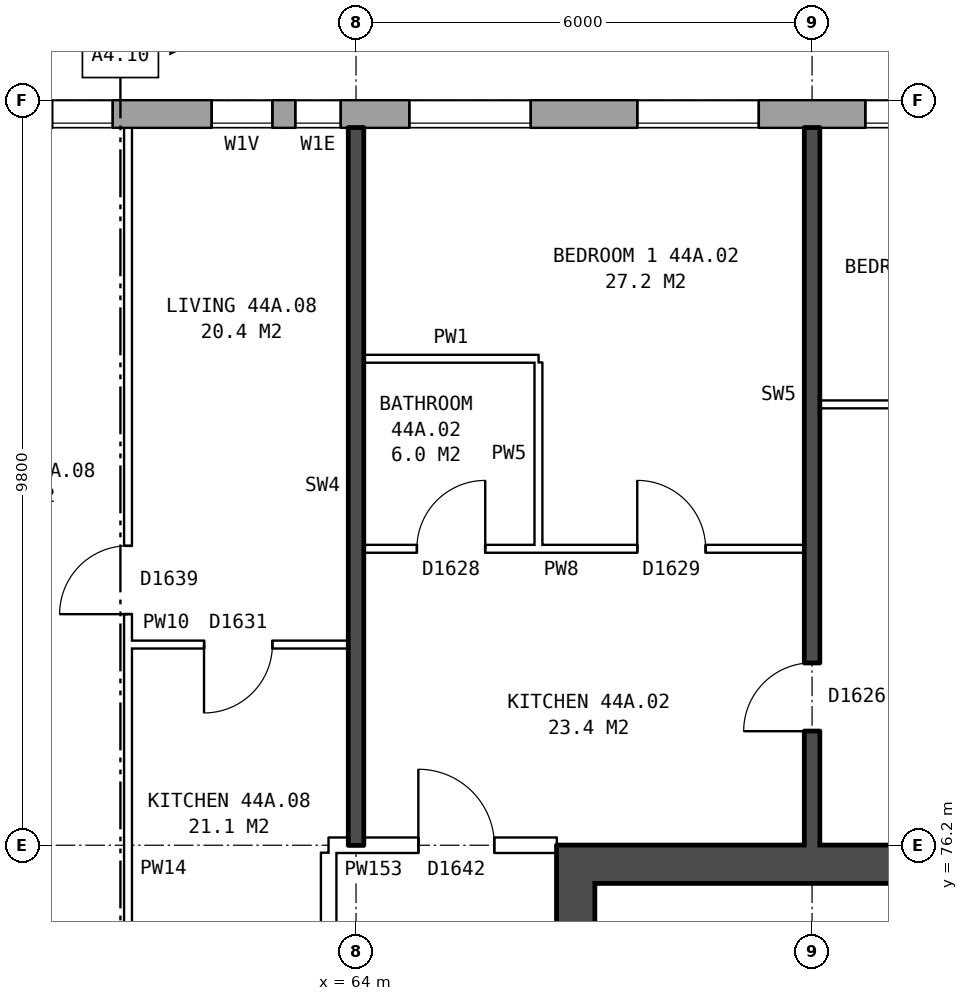
"""IFC4 building model, lengths in metres.
Left out: names, types, materials, properties, quantities, classifications, styles, units other than length and angle.
Written with IfcOpenShell. Run it as: python <this file> out.ifc"""

import sys

from ifc_helpers import new_model, si_unit, direction, frame, frame_2d, origin, place, context, subcontext, project, spatial, rectangle, extrude, element, fill, save


model = new_model("IFC4")
c1 = context("Model", 3, precision=1e-05, world=origin(), true_north=direction((0.0, 1.0)))
c2 = subcontext(c1, "Body", "Model", "MODEL_VIEW")
j1 = project(units=[si_unit("LENGTHUNIT", "METRE"), si_unit("PLANEANGLEUNIT", "RADIAN")], contexts=[c1])
p1 = place(None, origin())
s1 = spatial("IfcSite", under=j1, at=p1, CompositionType="ELEMENT")
p2 = place(p1, origin())
s2 = spatial("IfcBuilding", under=s1, at=p2, CompositionType="ELEMENT")
p3 = place(p2, frame((0.0, 0.0, 157.8)))
s3 = spatial("IfcBuildingStorey", under=s2, at=p3, CompositionType="ELEMENT", Elevation=157.8)
p4 = place(p3, frame((72.925, 85.82, 0.0), z_axis=(0.0, 0.0, 1.0), x_axis=(-1.0, 0.0, 0.0)))
e1 = element("IfcWall", 1, at=p4, inside=s3, PredefinedType="STANDARD", context=c2, shape_type="SweptSolid", body=[
    extrude(rectangle(XDim=41.351, YDim=0.36, at=frame_2d((20.675, 0.0))), origin(), (0.0, 0.0, 1.0), 2.85),
])
p5 = place(p4, frame((0.625, 0.0, 0.8)))
e2 = element("IfcOpeningElement", 2, at=p5, cuts=e1, PredefinedType="OPENING", context=c2, shape_type="SweptSolid", body=[
    extrude(rectangle(XDim=1.6, YDim=1.8, at=frame_2d((0.8, 0.9))), frame((0.0, 0.19, 0.0), z_axis=(0.0, -1.0, 0.0), x_axis=(1.0, 0.0, 0.0)), (0.0, 0.0, 1.0), 0.38),
])
p6 = place(p4, frame((3.625, 0.0, 0.8)))
e3 = element("IfcOpeningElement", 3, at=p6, cuts=e1, PredefinedType="OPENING", context=c2, shape_type="SweptSolid", body=[
    extrude(rectangle(XDim=1.6, YDim=1.8, at=frame_2d((0.8, 0.9))), frame((0.0, 0.19, 0.0), z_axis=(0.0, -1.0, 0.0), x_axis=(1.0, 0.0, 0.0)), (0.0, 0.0, 1.0), 0.38),
])
p7 = place(p4, frame((6.625, 0.0, 0.8)))
e4 = element("IfcOpeningElement", 4, at=p7, cuts=e1, PredefinedType="OPENING", context=c2, shape_type="SweptSolid", body=[
    extrude(rectangle(XDim=1.6, YDim=1.8, at=frame_2d((0.8, 0.9))), frame((0.0, 0.19, 0.0), z_axis=(0.0, -1.0, 0.0), x_axis=(1.0, 0.0, 0.0)), (0.0, 0.0, 1.0), 0.38),
])
p8 = place(p4, frame((9.125, 0.0, 0.8)))
e5 = element("IfcOpeningElement", 5, at=p8, cuts=e1, PredefinedType="OPENING", context=c2, shape_type="SweptSolid", body=[
    extrude(rectangle(XDim=0.6, YDim=1.8, at=frame_2d((0.3, 0.9))), frame((0.0, 0.19, 0.0), z_axis=(0.0, -1.0, 0.0), x_axis=(1.0, 0.0, 0.0)), (0.0, 0.0, 1.0), 0.38),
])
p9 = place(p4, frame((12.125, 0.0, 0.8)))
e6 = element("IfcOpeningElement", 6, at=p9, cuts=e1, PredefinedType="OPENING", context=c2, shape_type="SweptSolid", body=[
    extrude(rectangle(XDim=0.8, YDim=0.9, at=frame_2d((0.4, 0.45))), frame((0.0, 0.19, 0.0), z_axis=(0.0, -1.0, 0.0), x_axis=(1.0, 0.0, 0.0)), (0.0, 0.0, 1.0), 0.38),
])
p10 = place(p4, frame((15.625, 0.0, 0.8)))
e7 = element("IfcOpeningElement", 7, at=p10, cuts=e1, PredefinedType="OPENING", context=c2, shape_type="SweptSolid", body=[
    extrude(rectangle(XDim=1.6, YDim=1.8, at=frame_2d((0.8, 0.9))), frame((0.0, 0.19, 0.0), z_axis=(0.0, -1.0, 0.0), x_axis=(1.0, 0.0, 0.0)), (0.0, 0.0, 1.0), 0.38),
])
p11 = place(p4, frame((18.625, 0.0, 0.8)))
e8 = element("IfcOpeningElement", 8, at=p11, cuts=e1, PredefinedType="OPENING", context=c2, shape_type="SweptSolid", body=[
    extrude(rectangle(XDim=1.6, YDim=1.8, at=frame_2d((0.8, 0.9))), frame((0.0, 0.19, 0.0), z_axis=(0.0, -1.0, 0.0), x_axis=(1.0, 0.0, 0.0)), (0.0, 0.0, 1.0), 0.38),
])
p12 = place(p4, frame((21.625, 0.0, 0.8)))
e9 = element("IfcOpeningElement", 9, at=p12, cuts=e1, PredefinedType="OPENING", context=c2, shape_type="SweptSolid", body=[
    extrude(rectangle(XDim=1.6, YDim=1.8, at=frame_2d((0.8, 0.9))), frame((0.0, 0.19, 0.0), z_axis=(0.0, -1.0, 0.0), x_axis=(1.0, 0.0, 0.0)), (0.0, 0.0, 1.0), 0.38),
])
p13 = place(p4, frame((24.625, 0.0, 0.8)))
e10 = element("IfcOpeningElement", 10, at=p13, cuts=e1, PredefinedType="OPENING", context=c2, shape_type="SweptSolid", body=[
    extrude(rectangle(XDim=1.6, YDim=1.8, at=frame_2d((0.8, 0.9))), frame((0.0, 0.19, 0.0), z_axis=(0.0, -1.0, 0.0), x_axis=(1.0, 0.0, 0.0)), (0.0, 0.0, 1.0), 0.38),
])
p14 = place(p4, frame((27.125, 0.0, 0.8)))
e11 = element("IfcOpeningElement", 11, at=p14, cuts=e1, PredefinedType="OPENING", context=c2, shape_type="SweptSolid", body=[
    extrude(rectangle(XDim=0.8, YDim=1.8, at=frame_2d((0.4, 0.9))), frame((0.0, 0.19, 0.0), z_axis=(0.0, -1.0, 0.0), x_axis=(1.0, 0.0, 0.0)), (0.0, 0.0, 1.0), 0.38),
])
p15 = place(p4, frame((28.225, 0.0, 0.8)))
e12 = element("IfcOpeningElement", 12, at=p15, cuts=e1, PredefinedType="OPENING", context=c2, shape_type="SweptSolid", body=[
    extrude(rectangle(XDim=1.0, YDim=0.9, at=frame_2d((0.5, 0.45))), frame((0.0, 0.19, 0.0), z_axis=(0.0, -1.0, 0.0), x_axis=(1.0, 0.0, 0.0)), (0.0, 0.0, 1.0), 0.38),
])
p16 = place(p4, frame((33.625, 0.0, 0.8)))
e13 = element("IfcOpeningElement", 13, at=p16, cuts=e1, PredefinedType="OPENING", context=c2, shape_type="SweptSolid", body=[
    extrude(rectangle(XDim=1.6, YDim=1.8, at=frame_2d((0.8, 0.9))), frame((0.0, 0.19, 0.0), z_axis=(0.0, -1.0, 0.0), x_axis=(1.0, 0.0, 0.0)), (0.0, 0.0, 1.0), 0.38),
])
p17 = place(p4, frame((36.625, 0.0, 0.8)))
e14 = element("IfcOpeningElement", 14, at=p17, cuts=e1, PredefinedType="OPENING", context=c2, shape_type="SweptSolid", body=[
    extrude(rectangle(XDim=1.6, YDim=1.8, at=frame_2d((0.8, 0.9))), frame((0.0, 0.19, 0.0), z_axis=(0.0, -1.0, 0.0), x_axis=(1.0, 0.0, 0.0)), (0.0, 0.0, 1.0), 0.38),
])
p18 = place(p4, frame((10.025, 0.0, 1.7)))
e15 = element("IfcOpeningElement", 15, at=p18, cuts=e1, PredefinedType="OPENING", context=c2, shape_type="SweptSolid", body=[
    extrude(rectangle(XDim=0.8, YDim=0.9, at=frame_2d((0.4, 0.45))), frame((0.0, 0.19, 0.0), z_axis=(0.0, -1.0, 0.0), x_axis=(1.0, 0.0, 0.0)), (0.0, 0.0, 1.0), 0.38),
])
p19 = place(p4, frame((13.275, 0.0, 0.8)))
e16 = element("IfcOpeningElement", 16, at=p19, cuts=e1, PredefinedType="OPENING", context=c2, shape_type="SweptSolid", body=[
    extrude(rectangle(XDim=1.4, YDim=1.8, at=frame_2d((0.7, 0.9))), frame((0.0, 0.19, 0.0), z_axis=(0.0, -1.0, 0.0), x_axis=(1.0, 0.0, 0.0)), (0.0, 0.0, 1.0), 0.38),
])
p20 = place(p4, frame((30.475, 0.0, 1.7)))
e17 = element("IfcOpeningElement", 17, at=p20, cuts=e1, PredefinedType="OPENING", context=c2, shape_type="SweptSolid", body=[
    extrude(rectangle(XDim=0.8, YDim=0.9, at=frame_2d((0.4, 0.45))), frame((0.0, 0.19, 0.0), z_axis=(0.0, -1.0, 0.0), x_axis=(1.0, 0.0, 0.0)), (0.0, 0.0, 1.0), 0.38),
])
p21 = place(p4, frame((31.625, 0.0, 0.8)))
e18 = element("IfcOpeningElement", 18, at=p21, cuts=e1, PredefinedType="OPENING", context=c2, shape_type="SweptSolid", body=[
    extrude(rectangle(XDim=1.0, YDim=1.8, at=frame_2d((0.5, 0.9))), frame((0.0, 0.19, 0.0), z_axis=(0.0, -1.0, 0.0), x_axis=(1.0, 0.0, 0.0)), (0.0, 0.0, 1.0), 0.38),
])
p22 = place(p3, frame((66.89, 63.8, 0.0), z_axis=(0.0, 0.0, 1.0), x_axis=(0.0, 1.0, 0.0)))
e19 = element("IfcWall", 19, at=p22, inside=s3, PredefinedType="SHEAR", context=c2, shape_type="SweptSolid", body=[
    extrude(rectangle(XDim=12.4, YDim=0.5, at=frame_2d((6.2, 0.0))), origin(), (0.0, 0.0, 1.0), 2.85),
])
p23 = place(p22, frame((1.325, 0.0, 0.0)))
e20 = element("IfcOpeningElement", 20, at=p23, cuts=e19, PredefinedType="OPENING", context=c2, shape_type="SweptSolid", body=[
    extrude(rectangle(XDim=1.1, YDim=2.1, at=frame_2d((0.55, 1.05))), frame((0.0, 0.26, 0.0), z_axis=(0.0, -1.0, 0.0), x_axis=(1.0, 0.0, 0.0)), (0.0, 0.0, 1.0), 0.52),
])
p24 = place(p22, frame((3.6, 0.0, 0.0)))
e21 = element("IfcOpeningElement", 21, at=p24, cuts=e19, PredefinedType="OPENING", context=c2, shape_type="SweptSolid", body=[
    extrude(rectangle(XDim=1.1, YDim=2.1, at=frame_2d((0.55, 1.05))), frame((0.0, 0.26, 0.0), z_axis=(0.0, -1.0, 0.0), x_axis=(1.0, 0.0, 0.0)), (0.0, 0.0, 1.0), 0.52),
])
p25 = place(p22, frame((5.8, 0.0, 0.0)))
e22 = element("IfcOpeningElement", 22, at=p25, cuts=e19, PredefinedType="OPENING", context=c2, shape_type="SweptSolid", body=[
    extrude(rectangle(XDim=1.1, YDim=2.1, at=frame_2d((0.55, 1.05))), frame((0.0, 0.26, 0.0), z_axis=(0.0, -1.0, 0.0), x_axis=(1.0, 0.0, 0.0)), (0.0, 0.0, 1.0), 0.52),
])
p26 = place(p22, frame((8.0, 0.0, 0.0)))
e23 = element("IfcOpeningElement", 23, at=p26, cuts=e19, PredefinedType="OPENING", context=c2, shape_type="SweptSolid", body=[
    extrude(rectangle(XDim=1.1, YDim=2.1, at=frame_2d((0.55, 1.05))), frame((0.0, 0.26, 0.0), z_axis=(0.0, -1.0, 0.0), x_axis=(1.0, 0.0, 0.0)), (0.0, 0.0, 1.0), 0.52),
])
p27 = place(p22, frame((9.9, 0.0, 0.0)))
e24 = element("IfcOpeningElement", 24, at=p27, cuts=e19, PredefinedType="OPENING", context=c2, shape_type="SweptSolid", body=[
    extrude(rectangle(XDim=1.1, YDim=2.1, at=frame_2d((0.55, 1.05))), frame((0.0, 0.26, 0.0), z_axis=(0.0, -1.0, 0.0), x_axis=(1.0, 0.0, 0.0)), (0.0, 0.0, 1.0), 0.52),
])
p28 = place(p3, frame((67.14, 75.95, 0.0), z_axis=(0.0, 0.0, 1.0), x_axis=(1.0, 0.0, 0.0)))
e25 = element("IfcWall", 25, at=p28, inside=s3, PredefinedType="SHEAR", context=c2, shape_type="SweptSolid", body=[
    extrude(rectangle(XDim=8.0, YDim=0.5, at=frame_2d((4.0, 0.0))), origin(), (0.0, 0.0, 1.0), 2.85),
])
p29 = place(p3, frame((63.64, 63.9, 0.0), z_axis=(0.0, 0.0, 1.0), x_axis=(0.0, 1.0, 0.0)))
e26 = element("IfcWall", 26, at=p29, inside=s3, PredefinedType="PARTITIONING", context=c2, shape_type="SweptSolid", body=[
    extrude(rectangle(XDim=12.2, YDim=0.2, at=frame_2d((6.1, 0.0))), origin(), (0.0, 0.0, 1.0), 2.85),
])
p30 = place(p29, frame((5.1, 0.0, 0.0)))
e27 = element("IfcOpeningElement", 27, at=p30, cuts=e26, PredefinedType="OPENING", context=c2, shape_type="SweptSolid", body=[
    extrude(rectangle(XDim=2.0, YDim=2.1, at=frame_2d((1.0, 1.05))), frame((0.0, 0.11, 0.0), z_axis=(0.0, -1.0, 0.0), x_axis=(1.0, 0.0, 0.0)), (0.0, 0.0, 1.0), 0.22),
])
p31 = place(p3, frame((63.64, 76.2, 0.0), z_axis=(0.0, 0.0, 1.0), x_axis=(1.0, 0.0, 0.0)))
e28 = element("IfcWall", 28, at=p31, inside=s3, PredefinedType="PARTITIONING", context=c2, shape_type="SweptSolid", body=[
    extrude(rectangle(XDim=3.0, YDim=0.2, at=frame_2d((1.5, 0.0))), origin(), (0.0, 0.0, 1.0), 2.85),
])
p32 = place(p31, frame((1.18, 0.0, 0.0)))
e29 = element("IfcOpeningElement", 29, at=p32, cuts=e28, PredefinedType="OPENING", context=c2, shape_type="SweptSolid", body=[
    extrude(rectangle(XDim=1.0, YDim=2.1, at=frame_2d((0.5, 1.05))), frame((0.0, 0.11, 0.0), z_axis=(0.0, -1.0, 0.0), x_axis=(1.0, 0.0, 0.0)), (0.0, 0.0, 1.0), 0.22),
])
p33 = place(p3, frame((61.0, 78.84, 0.0), z_axis=(0.0, 0.0, 1.0), x_axis=(1.0, 0.0, 0.0)))
e30 = element("IfcWall", 30, at=p33, inside=s3, PredefinedType="PARTITIONING", context=c2, shape_type="SweptSolid", body=[
    extrude(rectangle(XDim=2.9, YDim=0.1, at=frame_2d((1.45, 0.0))), origin(), (0.0, 0.0, 1.0), 2.85),
])
p34 = place(p33, frame((1.0, 0.0, 0.0)))
e31 = element("IfcOpeningElement", 31, at=p34, cuts=e30, PredefinedType="OPENING", context=c2, shape_type="SweptSolid", body=[
    extrude(rectangle(XDim=0.9, YDim=2.1, at=frame_2d((0.45, 1.05))), frame((0.0, 0.06, 0.0), z_axis=(0.0, -1.0, 0.0), x_axis=(1.0, 0.0, 0.0)), (0.0, 0.0, 1.0), 0.12),
])
p35 = place(p3, frame((64.1, 80.1, 0.0), z_axis=(0.0, 0.0, 1.0), x_axis=(1.0, 0.0, 0.0)))
e32 = element("IfcWall", 32, at=p35, inside=s3, PredefinedType="PARTITIONING", context=c2, shape_type="SweptSolid", body=[
    extrude(rectangle(XDim=5.8, YDim=0.1, at=frame_2d((2.9, 0.0))), origin(), (0.0, 0.0, 1.0), 2.85),
])
p36 = place(p35, frame((3.6, 0.0, 0.0)))
e33 = element("IfcOpeningElement", 33, at=p36, cuts=e32, PredefinedType="OPENING", context=c2, shape_type="SweptSolid", body=[
    extrude(rectangle(XDim=0.9, YDim=2.1, at=frame_2d((0.45, 1.05))), frame((0.0, 0.06, 0.0), z_axis=(0.0, -1.0, 0.0), x_axis=(1.0, 0.0, 0.0)), (0.0, 0.0, 1.0), 0.12),
])
p37 = place(p35, frame((0.7, 0.0, 0.0)))
e34 = element("IfcOpeningElement", 34, at=p37, cuts=e32, PredefinedType="OPENING", context=c2, shape_type="SweptSolid", body=[
    extrude(rectangle(XDim=0.9, YDim=2.1, at=frame_2d((0.45, 1.05))), frame((0.0, 0.06, 0.0), z_axis=(0.0, -1.0, 0.0), x_axis=(1.0, 0.0, 0.0)), (0.0, 0.0, 1.0), 0.12),
])
p38 = place(p3, frame((70.1, 82.0, 0.0), z_axis=(0.0, 0.0, 1.0), x_axis=(1.0, 0.0, 0.0)))
e35 = element("IfcWall", 35, at=p38, inside=s3, PredefinedType="PARTITIONING", context=c2, shape_type="SweptSolid", body=[
    extrude(rectangle(XDim=5.54, YDim=0.1, at=frame_2d((2.77, 0.0))), origin(), (0.0, 0.0, 1.0), 2.85),
])
p39 = place(p38, frame((2.32, 0.0, 0.0)))
e36 = element("IfcOpeningElement", 36, at=p39, cuts=e35, PredefinedType="OPENING", context=c2, shape_type="SweptSolid", body=[
    extrude(rectangle(XDim=0.9, YDim=2.1, at=frame_2d((0.45, 1.05))), frame((0.0, 0.06, 0.0), z_axis=(0.0, -1.0, 0.0), x_axis=(1.0, 0.0, 0.0)), (0.0, 0.0, 1.0), 0.12),
])
p40 = place(p3, frame((64.1, 82.6, 0.0), z_axis=(0.0, 0.0, 1.0), x_axis=(1.0, 0.0, 0.0)))
e37 = element("IfcWall", 37, at=p40, inside=s3, PredefinedType="PARTITIONING", context=c2, shape_type="SweptSolid", body=[
    extrude(rectangle(XDim=2.3, YDim=0.1, at=frame_2d((1.15, 0.0))), origin(), (0.0, 0.0, 1.0), 2.85),
])
p41 = place(p3, frame((61.0, 71.3, 0.0), z_axis=(0.0, 0.0, 1.0), x_axis=(0.0, 1.0, 0.0)))
e38 = element("IfcWall", 38, at=p41, inside=s3, PredefinedType="PARTITIONING", context=c2, shape_type="SweptSolid", body=[
    extrude(rectangle(XDim=14.34, YDim=0.1, at=frame_2d((7.17, 0.0))), origin(), (0.0, 0.0, 1.0), 2.85),
])
p42 = place(p41, frame((7.94, 0.0, 0.0)))
e39 = element("IfcOpeningElement", 39, at=p42, cuts=e38, PredefinedType="OPENING", context=c2, shape_type="SweptSolid", body=[
    extrude(rectangle(XDim=0.9, YDim=2.1, at=frame_2d((0.45, 1.05))), frame((0.0, 0.06, 0.0), z_axis=(0.0, -1.0, 0.0), x_axis=(1.0, 0.0, 0.0)), (0.0, 0.0, 1.0), 0.12),
])
p43 = place(p41, frame((0.9, 0.0, 0.0)))
e40 = element("IfcOpeningElement", 40, at=p43, cuts=e38, PredefinedType="OPENING", context=c2, shape_type="SweptSolid", body=[
    extrude(rectangle(XDim=0.9, YDim=2.1, at=frame_2d((0.45, 1.05))), frame((0.0, 0.06, 0.0), z_axis=(0.0, -1.0, 0.0), x_axis=(1.0, 0.0, 0.0)), (0.0, 0.0, 1.0), 0.12),
])
p44 = place(p3, frame((64.0, 76.2, 0.0), z_axis=(0.0, 0.0, 1.0), x_axis=(0.0, 1.0, 0.0)))
e41 = element("IfcWall", 41, at=p44, inside=s3, PredefinedType="SOLIDWALL", context=c2, shape_type="SweptSolid", body=[
    extrude(rectangle(XDim=9.44, YDim=0.2, at=frame_2d((4.72, 0.0))), origin(), (0.0, 0.0, 1.0), 2.85),
])
p45 = place(p3, frame((66.4, 80.15, 0.0), z_axis=(0.0, 0.0, 1.0), x_axis=(0.0, 1.0, 0.0)))
e42 = element("IfcWall", 42, at=p45, inside=s3, PredefinedType="PARTITIONING", context=c2, shape_type="SweptSolid", body=[
    extrude(rectangle(XDim=2.4, YDim=0.1, at=frame_2d((1.2, 0.0))), origin(), (0.0, 0.0, 1.0), 2.85),
])
p46 = place(p3, frame((70.0, 76.2, 0.0), z_axis=(0.0, 0.0, 1.0), x_axis=(0.0, 1.0, 0.0)))
e43 = element("IfcWall", 43, at=p46, inside=s3, PredefinedType="SOLIDWALL", context=c2, shape_type="SweptSolid", body=[
    extrude(rectangle(XDim=9.44, YDim=0.2, at=frame_2d((4.72, 0.0))), origin(), (0.0, 0.0, 1.0), 2.85),
])
p47 = place(p46, frame((1.5, 0.0, 0.0)))
e44 = element("IfcOpeningElement", 44, at=p47, cuts=e43, PredefinedType="OPENING", context=c2, shape_type="SweptSolid", body=[
    extrude(rectangle(XDim=0.9, YDim=2.1, at=frame_2d((0.45, 1.05))), frame((0.0, 0.11, 0.0), z_axis=(0.0, -1.0, 0.0), x_axis=(1.0, 0.0, 0.0)), (0.0, 0.0, 1.0), 0.22),
])
p48 = place(p5, origin())
e45 = element("IfcWindow", 45, at=p48, inside=s3, PartitioningType="SINGLE_PANEL", PredefinedType="WINDOW", context=c2, shape_type="SweptSolid", body=[
    extrude(rectangle(XDim=1.6, YDim=1.8, at=frame_2d((0.8, 0.9))), frame((0.0, 0.15, 0.0), z_axis=(0.0, -1.0, 0.0), x_axis=(1.0, 0.0, 0.0)), (0.0, 0.0, 1.0), 0.06),
])
fill(e2, e45)
p49 = place(p6, origin())
e46 = element("IfcWindow", 46, at=p49, inside=s3, PartitioningType="SINGLE_PANEL", PredefinedType="WINDOW", context=c2, shape_type="SweptSolid", body=[
    extrude(rectangle(XDim=1.6, YDim=1.8, at=frame_2d((0.8, 0.9))), frame((0.0, 0.15, 0.0), z_axis=(0.0, -1.0, 0.0), x_axis=(1.0, 0.0, 0.0)), (0.0, 0.0, 1.0), 0.06),
])
fill(e3, e46)
p50 = place(p7, origin())
e47 = element("IfcWindow", 47, at=p50, inside=s3, PartitioningType="SINGLE_PANEL", PredefinedType="WINDOW", context=c2, shape_type="SweptSolid", body=[
    extrude(rectangle(XDim=1.6, YDim=1.8, at=frame_2d((0.8, 0.9))), frame((0.0, 0.15, 0.0), z_axis=(0.0, -1.0, 0.0), x_axis=(1.0, 0.0, 0.0)), (0.0, 0.0, 1.0), 0.06),
])
fill(e4, e47)
p51 = place(p8, origin())
e48 = element("IfcWindow", 48, at=p51, inside=s3, PartitioningType="SINGLE_PANEL", PredefinedType="WINDOW", context=c2, shape_type="SweptSolid", body=[
    extrude(rectangle(XDim=0.6, YDim=1.8, at=frame_2d((0.3, 0.9))), frame((0.0, 0.15, 0.0), z_axis=(0.0, -1.0, 0.0), x_axis=(1.0, 0.0, 0.0)), (0.0, 0.0, 1.0), 0.06),
])
fill(e5, e48)
p52 = place(p9, origin())
e49 = element("IfcWindow", 49, at=p52, inside=s3, PartitioningType="SINGLE_PANEL", PredefinedType="WINDOW", context=c2, shape_type="SweptSolid", body=[
    extrude(rectangle(XDim=0.8, YDim=0.9, at=frame_2d((0.4, 0.45))), frame((0.0, 0.15, 0.0), z_axis=(0.0, -1.0, 0.0), x_axis=(1.0, 0.0, 0.0)), (0.0, 0.0, 1.0), 0.06),
])
fill(e6, e49)
p53 = place(p36, origin())
e50 = element("IfcDoor", 50, at=p53, inside=s3, OperationType="SINGLE_SWING_LEFT", PredefinedType="DOOR", context=c2, shape_type="SweptSolid", body=[
    extrude(rectangle(XDim=0.9, YDim=2.1, at=frame_2d((0.45, 1.05))), frame((0.0, 0.025, 0.0), z_axis=(0.0, -1.0, 0.0), x_axis=(1.0, 0.0, 0.0)), (0.0, 0.0, 1.0), 0.05),
])
fill(e33, e50)
p54 = place(p32, origin())
e51 = element("IfcDoor", 51, at=p54, inside=s3, OperationType="SINGLE_SWING_LEFT", PredefinedType="DOOR", context=c2, shape_type="SweptSolid", body=[
    extrude(rectangle(XDim=1.0, YDim=2.1, at=frame_2d((0.5, 1.05))), frame((0.0, 0.025, 0.0), z_axis=(0.0, -1.0, 0.0), x_axis=(1.0, 0.0, 0.0)), (0.0, 0.0, 1.0), 0.05),
])
fill(e29, e51)
p55 = place(p47, origin())
e52 = element("IfcDoor", 52, at=p55, inside=s3, OperationType="SINGLE_SWING_LEFT", PredefinedType="DOOR", context=c2, shape_type="SweptSolid", body=[
    extrude(rectangle(XDim=0.9, YDim=2.1, at=frame_2d((0.45, 1.05))), frame((0.0, 0.025, 0.0), z_axis=(0.0, -1.0, 0.0), x_axis=(1.0, 0.0, 0.0)), (0.0, 0.0, 1.0), 0.05),
])
fill(e44, e52)
p56 = place(p37, origin())
e53 = element("IfcDoor", 53, at=p56, inside=s3, OperationType="SINGLE_SWING_RIGHT", PredefinedType="DOOR", context=c2, shape_type="SweptSolid", body=[
    extrude(rectangle(XDim=0.9, YDim=2.1, at=frame_2d((0.45, 1.05))), frame((0.0, 0.025, 0.0), z_axis=(0.0, -1.0, 0.0), x_axis=(1.0, 0.0, 0.0)), (0.0, 0.0, 1.0), 0.05),
])
fill(e34, e53)
p57 = place(p42, origin())
e54 = element("IfcDoor", 54, at=p57, inside=s3, OperationType="SINGLE_SWING_LEFT", PredefinedType="DOOR", context=c2, shape_type="SweptSolid", body=[
    extrude(rectangle(XDim=0.9, YDim=2.1, at=frame_2d((0.45, 1.05))), frame((0.0, 0.025, 0.0), z_axis=(0.0, -1.0, 0.0), x_axis=(1.0, 0.0, 0.0)), (0.0, 0.0, 1.0), 0.05),
])
fill(e39, e54)
p58 = place(p34, frame((0.9, 0.0, 0.0), z_axis=(0.0, 0.0, 1.0), x_axis=(-1.0, 0.0, 0.0)))
e55 = element("IfcDoor", 55, at=p58, inside=s3, OperationType="SINGLE_SWING_RIGHT", PredefinedType="DOOR", context=c2, shape_type="SweptSolid", body=[
    extrude(rectangle(XDim=0.9, YDim=2.1, at=frame_2d((0.45, 1.05))), frame((0.0, 0.025, 0.0), z_axis=(0.0, -1.0, 0.0), x_axis=(1.0, 0.0, 0.0)), (0.0, 0.0, 1.0), 0.05),
])
fill(e31, e55)
p59 = place(p18, origin())
e56 = element("IfcWindow", 56, at=p59, inside=s3, PartitioningType="SINGLE_PANEL", PredefinedType="WINDOW", context=c2, shape_type="SweptSolid", body=[
    extrude(rectangle(XDim=0.8, YDim=0.9, at=frame_2d((0.4, 0.45))), frame((0.0, 0.15, 0.0), z_axis=(0.0, -1.0, 0.0), x_axis=(1.0, 0.0, 0.0)), (0.0, 0.0, 1.0), 0.06),
])
fill(e15, e56)
save(model, sys.argv[1])
